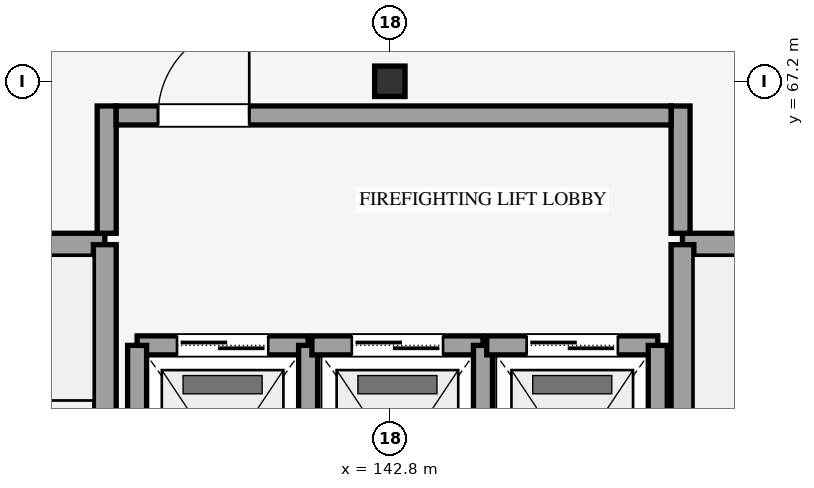
"""IFC4 building model, lengths in metres.
Left out: names, types, materials, properties, quantities, classifications, styles, units other than length and angle.
Written with IfcOpenShell. Run it as: python <this file> out.ifc"""

import sys

from ifc_helpers import new_model, si_unit, direction, frame, frame_2d, origin, origin_2d, place, context, subcontext, project, spatial, rectangle, i_section, extrude, element, fill, save


model = new_model("IFC4")
c1 = context("Model", 3, precision=1e-05, world=origin(), true_north=direction((0.0, 1.0)))
c2 = subcontext(c1, "Body", "Model", "MODEL_VIEW")
j1 = project(units=[si_unit("LENGTHUNIT", "METRE"), si_unit("PLANEANGLEUNIT", "RADIAN")], contexts=[c1])
p1 = place(None, origin())
s1 = spatial("IfcSite", under=j1, at=p1, CompositionType="ELEMENT")
p2 = place(p1, origin())
s2 = spatial("IfcBuilding", under=s1, at=p2, CompositionType="ELEMENT")
p3 = place(p2, frame((0.0, 0.0, 23.4)))
s3 = spatial("IfcBuildingStorey", under=s2, at=p3, CompositionType="ELEMENT", Elevation=23.4)
p4 = place(p3, frame((142.8, 67.2, 0.0), z_axis=(0.0, 0.0, 1.0), x_axis=(1.0, 0.0, 0.0)))
e1 = element("IfcColumn", 1, at=p4, inside=s3, PredefinedType="COLUMN", context=c2, shape_type="SweptSolid", body=[
    extrude(i_section(OverallWidth=0.4, OverallDepth=0.4, WebThickness=0.013, FlangeThickness=0.021, FilletRadius=0.022, at=origin_2d()), origin(), (0.0, 0.0, 1.0), 4.5),
])
p5 = place(p3, frame((135.05, 65.05, 0.0), z_axis=(0.0, 0.0, 1.0), x_axis=(1.0, 0.0, 0.0)))
e2 = element("IfcWall", 2, at=p5, inside=s3, PredefinedType="SHEAR", context=c2, shape_type="SweptSolid", body=[
    extrude(rectangle(XDim=4.0, YDim=0.3, at=frame_2d((2.0, 0.0))), origin(), (0.0, 0.0, 1.0), 4.5),
])
p6 = place(p3, frame((139.05, 50.75, 0.0), z_axis=(0.0, 0.0, 1.0), x_axis=(0.0, 1.0, 0.0)))
e3 = element("IfcWall", 3, at=p6, inside=s3, PredefinedType="SHEAR", context=c2, shape_type="SweptSolid", body=[
    extrude(rectangle(XDim=14.3, YDim=0.3, at=frame_2d((7.15, 0.0))), origin(), (0.0, 0.0, 1.0), 4.5),
])
p7 = place(p3, frame((146.65, 65.05, 0.0), z_axis=(0.0, 0.0, 1.0), x_axis=(1.0, 0.0, 0.0)))
e4 = element("IfcWall", 4, at=p7, inside=s3, PredefinedType="SHEAR", context=c2, shape_type="SweptSolid", body=[
    extrude(rectangle(XDim=4.0, YDim=0.3, at=frame_2d((2.0, 0.0))), origin(), (0.0, 0.0, 1.0), 4.5),
])
p8 = place(p3, frame((146.65, 50.75, 0.0), z_axis=(0.0, 0.0, 1.0), x_axis=(0.0, 1.0, 0.0)))
e5 = element("IfcWall", 5, at=p8, inside=s3, PredefinedType="SHEAR", context=c2, shape_type="SweptSolid", body=[
    extrude(rectangle(XDim=14.3, YDim=0.3, at=frame_2d((7.15, 0.0))), origin(), (0.0, 0.0, 1.0), 4.5),
])
p9 = place(p3, frame((139.475, 63.725, 0.0), z_axis=(0.0, 0.0, 1.0), x_axis=(1.0, 0.0, 0.0)))
e6 = element("IfcWall", 6, at=p9, inside=s3, PredefinedType="SHEAR", context=c2, shape_type="SweptSolid", body=[
    extrude(rectangle(XDim=2.25, YDim=0.25, at=frame_2d((1.125, 0.0))), origin(), (0.0, 0.0, 1.0), 4.26),
])
p10 = place(p9, frame((0.525, 0.0, 0.0)))
e7 = element("IfcOpeningElement", 7, at=p10, cuts=e6, PredefinedType="OPENING", context=c2, shape_type="SweptSolid", body=[
    extrude(rectangle(XDim=1.2, YDim=2.18, at=frame_2d((0.6, 1.09))), frame((0.0, 0.135, 0.0), z_axis=(0.0, -1.0, 0.0), x_axis=(1.0, 0.0, 0.0)), (0.0, 0.0, 1.0), 0.27),
])
for number, where, z_axis, x_axis in (
    (8, (139.475, 60.675, 0.0), (0.0, 0.0, 1.0), (0.0, 1.0, 0.0)),
    (9, (141.725, 60.675, 0.0), (0.0, 0.0, 1.0), (0.0, 1.0, 0.0)),
):
    element("IfcWall", number, at=place(p3, frame(where, z_axis=z_axis, x_axis=x_axis)), inside=s3, PredefinedType="SHEAR", context=c2, shape_type="SweptSolid", body=[
        extrude(rectangle(XDim=3.05, YDim=0.25, at=frame_2d((1.525, 0.0))), origin(), (0.0, 0.0, 1.0), 4.26),
    ])
p11 = place(p3, frame((141.775, 63.725, 0.0), z_axis=(0.0, 0.0, 1.0), x_axis=(1.0, 0.0, 0.0)))
e10 = element("IfcWall", 10, at=p11, inside=s3, PredefinedType="SHEAR", context=c2, shape_type="SweptSolid", body=[
    extrude(rectangle(XDim=2.25, YDim=0.25, at=frame_2d((1.125, 0.0))), origin(), (0.0, 0.0, 1.0), 4.26),
])
p12 = place(p11, frame((0.525, 0.0, 0.0)))
e11 = element("IfcOpeningElement", 11, at=p12, cuts=e10, PredefinedType="OPENING", context=c2, shape_type="SweptSolid", body=[
    extrude(rectangle(XDim=1.2, YDim=2.18, at=frame_2d((0.6, 1.09))), frame((0.0, 0.135, 0.0), z_axis=(0.0, -1.0, 0.0), x_axis=(1.0, 0.0, 0.0)), (0.0, 0.0, 1.0), 0.27),
])
p13 = place(p3, frame((144.025, 60.675, 0.0), z_axis=(0.0, 0.0, 1.0), x_axis=(0.0, 1.0, 0.0)))
e12 = element("IfcWall", 12, at=p13, inside=s3, PredefinedType="SHEAR", context=c2, shape_type="SweptSolid", body=[
    extrude(rectangle(XDim=3.05, YDim=0.25, at=frame_2d((1.525, 0.0))), origin(), (0.0, 0.0, 1.0), 4.26),
])
p14 = place(p3, frame((144.075, 63.725, 0.0), z_axis=(0.0, 0.0, 1.0), x_axis=(1.0, 0.0, 0.0)))
e13 = element("IfcWall", 13, at=p14, inside=s3, PredefinedType="SHEAR", context=c2, shape_type="SweptSolid", body=[
    extrude(rectangle(XDim=2.25, YDim=0.25, at=frame_2d((1.125, 0.0))), origin(), (0.0, 0.0, 1.0), 4.26),
])
p15 = place(p14, frame((0.525, 0.0, 0.0)))
e14 = element("IfcOpeningElement", 14, at=p15, cuts=e13, PredefinedType="OPENING", context=c2, shape_type="SweptSolid", body=[
    extrude(rectangle(XDim=1.2, YDim=2.18, at=frame_2d((0.6, 1.09))), frame((0.0, 0.135, 0.0), z_axis=(0.0, -1.0, 0.0), x_axis=(1.0, 0.0, 0.0)), (0.0, 0.0, 1.0), 0.27),
])
p16 = place(p3, frame((146.325, 60.675, 0.0), z_axis=(0.0, 0.0, 1.0), x_axis=(0.0, 1.0, 0.0)))
e15 = element("IfcWall", 15, at=p16, inside=s3, PredefinedType="SHEAR", context=c2, shape_type="SweptSolid", body=[
    extrude(rectangle(XDim=3.05, YDim=0.25, at=frame_2d((1.525, 0.0))), origin(), (0.0, 0.0, 1.0), 4.26),
])
for number, where, z_axis, x_axis in (
    (16, (139.075, 65.2, 0.0), (0.0, 0.0, 1.0), (0.0, 1.0, 0.0)),
    (17, (146.625, 65.2, 0.0), (0.0, 0.0, 1.0), (0.0, 1.0, 0.0)),
):
    element("IfcWall", number, at=place(p3, frame(where, z_axis=z_axis, x_axis=x_axis)), inside=s3, PredefinedType="SHEAR", context=c2, shape_type="SweptSolid", body=[
        extrude(rectangle(XDim=1.675, YDim=0.25, at=frame_2d((0.837, 0.0))), origin(), (0.0, 0.0, 1.0), 4.26),
    ])
p17 = place(p3, frame((139.2, 66.75, 0.0), z_axis=(0.0, 0.0, 1.0), x_axis=(1.0, 0.0, 0.0)))
e18 = element("IfcWall", 18, at=p17, inside=s3, PredefinedType="SHEAR", context=c2, shape_type="SweptSolid", body=[
    extrude(rectangle(XDim=7.3, YDim=0.25, at=frame_2d((3.65, 0.0))), origin(), (0.0, 0.0, 1.0), 4.26),
])
p18 = place(p17, frame((0.55, 0.0, 0.0)))
e19 = element("IfcOpeningElement", 19, at=p18, cuts=e18, PredefinedType="OPENING", context=c2, shape_type="SweptSolid", body=[
    extrude(rectangle(XDim=1.2, YDim=2.15, at=frame_2d((0.6, 1.075))), frame((0.0, 0.135, 0.0), z_axis=(0.0, -1.0, 0.0), x_axis=(1.0, 0.0, 0.0)), (0.0, 0.0, 1.0), 0.27),
])
p19 = place(p10, origin())
e20 = element("IfcDoor", 20, at=p19, inside=s3, OperationType="DOUBLE_DOOR_SLIDING", PredefinedType="DOOR", context=c2, shape_type="SweptSolid", body=[
    extrude(rectangle(XDim=1.2, YDim=2.18, at=frame_2d((0.6, 1.09))), frame((0.0, 0.025, 0.0), z_axis=(0.0, -1.0, 0.0), x_axis=(1.0, 0.0, 0.0)), (0.0, 0.0, 1.0), 0.05),
])
fill(e7, e20)
p20 = place(p12, origin())
e21 = element("IfcDoor", 21, at=p20, inside=s3, OperationType="DOUBLE_DOOR_SLIDING", PredefinedType="DOOR", context=c2, shape_type="SweptSolid", body=[
    extrude(rectangle(XDim=1.2, YDim=2.18, at=frame_2d((0.6, 1.09))), frame((0.0, 0.025, 0.0), z_axis=(0.0, -1.0, 0.0), x_axis=(1.0, 0.0, 0.0)), (0.0, 0.0, 1.0), 0.05),
])
fill(e11, e21)
p21 = place(p15, origin())
e22 = element("IfcDoor", 22, at=p21, inside=s3, OperationType="DOUBLE_DOOR_SLIDING", PredefinedType="DOOR", context=c2, shape_type="SweptSolid", body=[
    extrude(rectangle(XDim=1.2, YDim=2.18, at=frame_2d((0.6, 1.09))), frame((0.0, 0.025, 0.0), z_axis=(0.0, -1.0, 0.0), x_axis=(1.0, 0.0, 0.0)), (0.0, 0.0, 1.0), 0.05),
])
fill(e14, e22)
p22 = place(p18, origin())
e23 = element("IfcDoor", 23, at=p22, inside=s3, OperationType="SINGLE_SWING_RIGHT", PredefinedType="DOOR", context=c2, shape_type="SweptSolid", body=[
    extrude(rectangle(XDim=1.2, YDim=2.15, at=frame_2d((0.6, 1.075))), frame((0.0, 0.025, 0.0), z_axis=(0.0, -1.0, 0.0), x_axis=(1.0, 0.0, 0.0)), (0.0, 0.0, 1.0), 0.05),
])
fill(e19, e23)
save(model, sys.argv[1])
